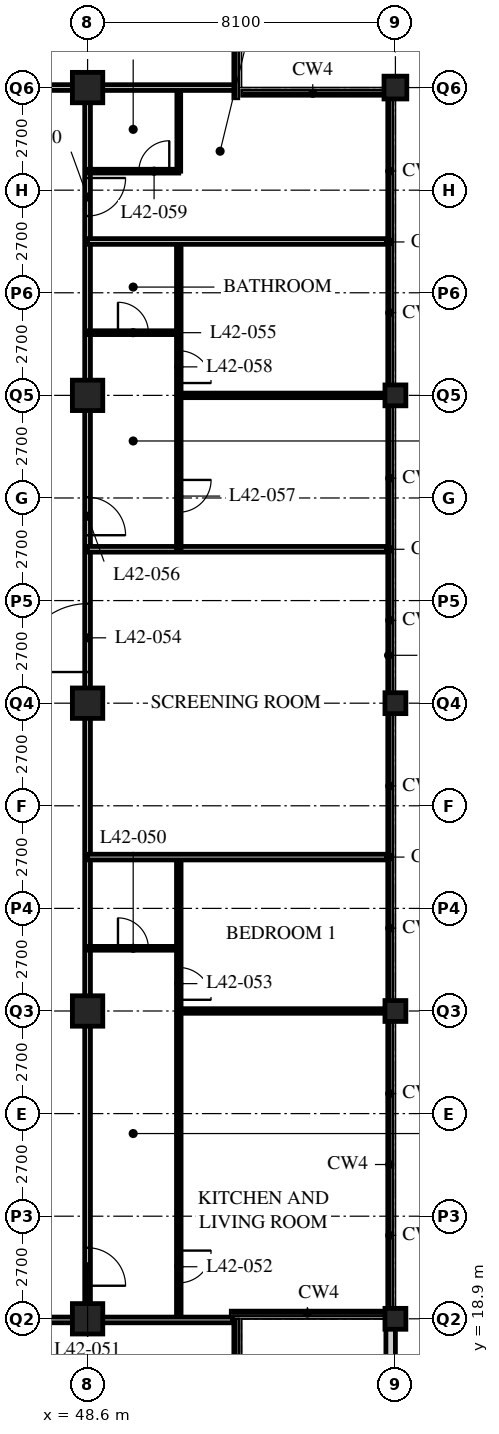
"""IFC4 building model, lengths in metres.
Left out: names, types, materials, properties, quantities, classifications, styles, units other than length and angle.
Written with IfcOpenShell. Run it as: python <this file> out.ifc"""

import sys

from ifc_helpers import new_model, si_unit, direction, frame, frame_2d, origin, origin_2d, place, context, subcontext, project, spatial, rectangle, hollow_rectangle, extrude, element, fill, save


model = new_model("IFC4")
c1 = context("Model", 3, precision=1e-05, world=origin(), true_north=direction((0.0, 1.0)))
c2 = subcontext(c1, "Body", "Model", "MODEL_VIEW")
j1 = project(units=[si_unit("LENGTHUNIT", "METRE"), si_unit("PLANEANGLEUNIT", "RADIAN")], contexts=[c1])
p1 = place(None, origin())
s1 = spatial("IfcSite", under=j1, at=p1, CompositionType="ELEMENT")
p2 = place(p1, origin())
s2 = spatial("IfcBuilding", under=s1, at=p2, CompositionType="ELEMENT")
p3 = place(p2, frame((0.0, 0.0, 165.0)))
s3 = spatial("IfcBuildingStorey", under=s2, at=p3, CompositionType="ELEMENT", Elevation=165.0)
for number, where, z_axis, x_axis in (
    (1, (48.6, 18.9, 0.0), (0.0, 0.0, 1.0), (1.0, 0.0, 0.0)),
    (2, (48.6, 27.0, 0.0), (0.0, 0.0, 1.0), (1.0, 0.0, 0.0)),
    (3, (48.6, 35.1, 0.0), (0.0, 0.0, 1.0), (1.0, 0.0, 0.0)),
    (4, (48.6, 43.2, 0.0), (0.0, 0.0, 1.0), (1.0, 0.0, 0.0)),
    (5, (48.6, 51.3, 0.0), (0.0, 0.0, 1.0), (1.0, 0.0, 0.0)),
):
    element("IfcColumn", number, at=place(p3, frame(where, z_axis=z_axis, x_axis=x_axis)), inside=s3, PredefinedType="COLUMN", context=c2, shape_type="SweptSolid", body=[
        extrude(hollow_rectangle(XDim=0.8, YDim=0.8, WallThickness=0.08, at=origin_2d()), origin(), (0.0, 0.0, 1.0), 5.4),
    ])
for number, where, z_axis, x_axis in (
    (6, (56.7, 18.9, 0.0), (0.0, 0.0, 1.0), (1.0, 0.0, 0.0)),
    (7, (56.7, 27.0, 0.0), (0.0, 0.0, 1.0), (1.0, 0.0, 0.0)),
    (8, (56.7, 35.1, 0.0), (0.0, 0.0, 1.0), (1.0, 0.0, 0.0)),
    (9, (56.7, 43.2, 0.0), (0.0, 0.0, 1.0), (1.0, 0.0, 0.0)),
):
    element("IfcColumn", number, at=place(p3, frame(where, z_axis=z_axis, x_axis=x_axis)), inside=s3, PredefinedType="COLUMN", context=c2, shape_type="SweptSolid", body=[
        extrude(hollow_rectangle(XDim=0.55, YDim=0.55, WallThickness=0.04, at=origin_2d()), origin(), (0.0, 0.0, 1.0), 5.4),
    ])
p4 = place(p3, frame((56.7, 51.3, 0.0), z_axis=(0.0, 0.0, 1.0), x_axis=(1.0, 0.0, 0.0)))
e10 = element("IfcColumn", 10, at=p4, inside=s3, PredefinedType="COLUMN", context=c2, shape_type="SweptSolid", body=[
    extrude(hollow_rectangle(XDim=0.6, YDim=0.6, WallThickness=0.05, at=origin_2d()), origin(), (0.0, 0.0, 1.0), 5.4),
])
p5 = place(p3, frame((56.575, 13.75, 0.0), z_axis=(0.0, 0.0, 1.0), x_axis=(0.0, 1.0, 0.0)))
e11 = element("IfcWall", 11, at=p5, inside=s3, PredefinedType="PARAPET", context=c2, shape_type="SweptSolid", body=[
    extrude(rectangle(XDim=5.15, YDim=0.25, at=frame_2d((2.575, 0.0))), origin(), (0.0, 0.0, 1.0), 1.38),
])
p6 = place(p3, frame((8.1, 18.9, 0.0), z_axis=(0.0, 0.0, 1.0), x_axis=(0.999999729567, -0.000735435758, 0.0)))
e12 = element("IfcWall", 12, at=p6, inside=s3, PredefinedType="PARTITIONING", context=c2, shape_type="SweptSolid", body=[
    extrude(rectangle(XDim=40.5, YDim=0.15, at=frame_2d((20.25, 0.0))), origin(), (0.0, 0.0, 1.0), 4.42),
])
p7 = place(p6, frame((4.45, 0.0, 0.0)))
e13 = element("IfcOpeningElement", 13, at=p7, cuts=e12, PredefinedType="OPENING", context=c2, shape_type="SweptSolid", body=[
    extrude(rectangle(XDim=1.0, YDim=2.1, at=frame_2d((0.5, 1.05))), frame((0.0, 0.085, 0.0), z_axis=(0.0, -1.0, 0.0), x_axis=(1.0, 0.0, 0.0)), (0.0, 0.0, 1.0), 0.17),
])
p8 = place(p6, frame((25.15, 0.0, 0.0)))
e14 = element("IfcOpeningElement", 14, at=p8, cuts=e12, PredefinedType="OPENING", context=c2, shape_type="SweptSolid", body=[
    extrude(rectangle(XDim=1.8, YDim=2.4, at=frame_2d((0.9, 1.2))), frame((0.0, 0.085, 0.0), z_axis=(0.0, -1.0, 0.0), x_axis=(1.0, 0.0, 0.0)), (0.0, 0.0, 1.0), 0.17),
])
p9 = place(p6, frame((29.875, 0.0, 0.0)))
e15 = element("IfcOpeningElement", 15, at=p9, cuts=e12, PredefinedType="OPENING", context=c2, shape_type="SweptSolid", body=[
    extrude(rectangle(XDim=1.0, YDim=2.1, at=frame_2d((0.5, 1.05))), frame((0.0, 0.085, 0.0), z_axis=(0.0, -1.0, 0.0), x_axis=(1.0, 0.0, 0.0)), (0.0, 0.0, 1.0), 0.17),
])
p10 = place(p6, frame((34.75, 0.0, 0.0)))
e16 = element("IfcOpeningElement", 16, at=p10, cuts=e12, PredefinedType="OPENING", context=c2, shape_type="SweptSolid", body=[
    extrude(rectangle(XDim=1.0, YDim=2.1, at=frame_2d((0.5, 1.05))), frame((0.0, 0.085, 0.0), z_axis=(0.0, -1.0, 0.0), x_axis=(1.0, 0.0, 0.0)), (0.0, 0.0, 1.0), 0.17),
])
p11 = place(p6, frame((1.525, 0.0, 0.0)))
e17 = element("IfcOpeningElement", 17, at=p11, cuts=e12, PredefinedType="OPENING", context=c2, shape_type="SweptSolid", body=[
    extrude(rectangle(XDim=1.0, YDim=2.1, at=frame_2d((0.5, 1.05))), frame((0.0, 0.085, 0.0), z_axis=(0.0, -1.0, 0.0), x_axis=(1.0, 0.0, 0.0)), (0.0, 0.0, 1.0), 0.17),
])
p12 = place(p6, frame((37.975, 0.0, 0.0)))
e18 = element("IfcOpeningElement", 18, at=p12, cuts=e12, PredefinedType="OPENING", context=c2, shape_type="SweptSolid", body=[
    extrude(rectangle(XDim=1.0, YDim=2.1, at=frame_2d((0.5, 1.05))), frame((0.0, 0.085, 0.0), z_axis=(0.0, -1.0, 0.0), x_axis=(1.0, 0.0, 0.0)), (0.0, 0.0, 1.0), 0.17),
])
p13 = place(p3, frame((8.1, 51.33, 0.0), z_axis=(0.0, 0.0, 1.0), x_axis=(0.999999725116, -0.000741463917, 0.0)))
e19 = element("IfcWall", 19, at=p13, inside=s3, PredefinedType="PARTITIONING", context=c2, shape_type="SweptSolid", body=[
    extrude(rectangle(XDim=40.5, YDim=0.15, at=frame_2d((20.25, 0.0))), origin(), (0.0, 0.0, 1.0), 4.42),
])
p14 = place(p13, frame((8.95, 0.0, 0.0)))
e20 = element("IfcOpeningElement", 20, at=p14, cuts=e19, PredefinedType="OPENING", context=c2, shape_type="SweptSolid", body=[
    extrude(rectangle(XDim=1.8, YDim=2.4, at=frame_2d((0.9, 1.2))), frame((0.0, 0.085, 0.0), z_axis=(0.0, -1.0, 0.0), x_axis=(1.0, 0.0, 0.0)), (0.0, 0.0, 1.0), 0.17),
])
p15 = place(p13, frame((17.05, 0.0, 0.0)))
e21 = element("IfcOpeningElement", 21, at=p15, cuts=e19, PredefinedType="OPENING", context=c2, shape_type="SweptSolid", body=[
    extrude(rectangle(XDim=1.8, YDim=2.4, at=frame_2d((0.9, 1.2))), frame((0.0, 0.085, 0.0), z_axis=(0.0, -1.0, 0.0), x_axis=(1.0, 0.0, 0.0)), (0.0, 0.0, 1.0), 0.17),
])
p16 = place(p13, frame((20.65, 0.0, 0.0)))
e22 = element("IfcOpeningElement", 22, at=p16, cuts=e19, PredefinedType="OPENING", context=c2, shape_type="SweptSolid", body=[
    extrude(rectangle(XDim=1.0, YDim=2.1, at=frame_2d((0.5, 1.05))), frame((0.0, 0.085, 0.0), z_axis=(0.0, -1.0, 0.0), x_axis=(1.0, 0.0, 0.0)), (0.0, 0.0, 1.0), 0.17),
])
p17 = place(p13, frame((28.75, 0.0, 0.0)))
e23 = element("IfcOpeningElement", 23, at=p17, cuts=e19, PredefinedType="OPENING", context=c2, shape_type="SweptSolid", body=[
    extrude(rectangle(XDim=1.0, YDim=2.1, at=frame_2d((0.5, 1.05))), frame((0.0, 0.085, 0.0), z_axis=(0.0, -1.0, 0.0), x_axis=(1.0, 0.0, 0.0)), (0.0, 0.0, 1.0), 0.17),
])
p18 = place(p13, frame((37.975, 0.0, 0.0)))
e24 = element("IfcOpeningElement", 24, at=p18, cuts=e19, PredefinedType="OPENING", context=c2, shape_type="SweptSolid", body=[
    extrude(rectangle(XDim=1.0, YDim=2.1, at=frame_2d((0.5, 1.05))), frame((0.0, 0.085, 0.0), z_axis=(0.0, -1.0, 0.0), x_axis=(1.0, 0.0, 0.0)), (0.0, 0.0, 1.0), 0.17),
])
p19 = place(p13, frame((1.525, 0.0, 0.0)))
e25 = element("IfcOpeningElement", 25, at=p19, cuts=e19, PredefinedType="OPENING", context=c2, shape_type="SweptSolid", body=[
    extrude(rectangle(XDim=1.0, YDim=2.1, at=frame_2d((0.5, 1.05))), frame((0.0, 0.085, 0.0), z_axis=(0.0, -1.0, 0.0), x_axis=(1.0, 0.0, 0.0)), (0.0, 0.0, 1.0), 0.17),
])
p20 = place(p3, frame((48.6, 18.87, 0.0), z_axis=(0.0, 0.0, 1.0), x_axis=(0.0, 1.0, 0.0)))
e26 = element("IfcWall", 26, at=p20, inside=s3, PredefinedType="PARTITIONING", context=c2, shape_type="SweptSolid", body=[
    extrude(rectangle(XDim=32.43, YDim=0.15, at=frame_2d((16.215, 0.0))), origin(), (0.0, 0.0, 1.0), 4.42),
])
p21 = place(p20, frame((0.9, 0.0, 0.0)))
e27 = element("IfcOpeningElement", 27, at=p21, cuts=e26, PredefinedType="OPENING", context=c2, shape_type="SweptSolid", body=[
    extrude(rectangle(XDim=1.0, YDim=2.1, at=frame_2d((0.5, 1.05))), frame((0.0, 0.085, 0.0), z_axis=(0.0, -1.0, 0.0), x_axis=(1.0, 0.0, 0.0)), (0.0, 0.0, 1.0), 0.17),
])
p22 = place(p20, frame((17.05, 0.0, 0.0)))
e28 = element("IfcOpeningElement", 28, at=p22, cuts=e26, PredefinedType="OPENING", context=c2, shape_type="SweptSolid", body=[
    extrude(rectangle(XDim=1.8, YDim=2.4, at=frame_2d((0.9, 1.2))), frame((0.0, 0.085, 0.0), z_axis=(0.0, -1.0, 0.0), x_axis=(1.0, 0.0, 0.0)), (0.0, 0.0, 1.0), 0.17),
])
p23 = place(p20, frame((20.65, 0.0, 0.0)))
e29 = element("IfcOpeningElement", 29, at=p23, cuts=e26, PredefinedType="OPENING", context=c2, shape_type="SweptSolid", body=[
    extrude(rectangle(XDim=1.0, YDim=2.1, at=frame_2d((0.5, 1.05))), frame((0.0, 0.085, 0.0), z_axis=(0.0, -1.0, 0.0), x_axis=(1.0, 0.0, 0.0)), (0.0, 0.0, 1.0), 0.17),
])
p24 = place(p20, frame((29.05, 0.0, 0.0)))
e30 = element("IfcOpeningElement", 30, at=p24, cuts=e26, PredefinedType="OPENING", context=c2, shape_type="SweptSolid", body=[
    extrude(rectangle(XDim=1.0, YDim=2.1, at=frame_2d((0.5, 1.05))), frame((0.0, 0.085, 0.0), z_axis=(0.0, -1.0, 0.0), x_axis=(1.0, 0.0, 0.0)), (0.0, 0.0, 1.0), 0.17),
])
p25 = place(p3, frame((51.0, 18.87, 0.0), z_axis=(0.0, 0.0, 1.0), x_axis=(0.0, 1.0, 0.0)))
e31 = element("IfcWall", 31, at=p25, inside=s3, PredefinedType="PARTITIONING", context=c2, shape_type="SweptSolid", body=[
    extrude(rectangle(XDim=12.18, YDim=0.12, at=frame_2d((6.09, 0.0))), origin(), (0.0, 0.0, 1.0), 5.19),
])
p26 = place(p25, frame((0.975, 0.0, 0.0)))
e32 = element("IfcOpeningElement", 32, at=p26, cuts=e31, PredefinedType="OPENING", context=c2, shape_type="SweptSolid", body=[
    extrude(rectangle(XDim=0.85, YDim=2.1, at=frame_2d((0.425, 1.05))), frame((0.0, 0.07, 0.0), z_axis=(0.0, -1.0, 0.0), x_axis=(1.0, 0.0, 0.0)), (0.0, 0.0, 1.0), 0.14),
])
p27 = place(p25, frame((8.425, 0.0, 0.0)))
e33 = element("IfcOpeningElement", 33, at=p27, cuts=e31, PredefinedType="OPENING", context=c2, shape_type="SweptSolid", body=[
    extrude(rectangle(XDim=0.85, YDim=2.1, at=frame_2d((0.425, 1.05))), frame((0.0, 0.07, 0.0), z_axis=(0.0, -1.0, 0.0), x_axis=(1.0, 0.0, 0.0)), (0.0, 0.0, 1.0), 0.14),
])
p28 = place(p3, frame((48.6, 28.65, 0.0), z_axis=(0.0, 0.0, 1.0), x_axis=(1.0, 0.0, 0.0)))
e34 = element("IfcWall", 34, at=p28, inside=s3, PredefinedType="PARTITIONING", context=c2, shape_type="SweptSolid", body=[
    extrude(rectangle(XDim=2.4, YDim=0.1, at=frame_2d((1.2, 0.0))), origin(), (0.0, 0.0, 1.0), 5.19),
])
p29 = place(p28, frame((0.8, 0.0, 0.0)))
e35 = element("IfcOpeningElement", 35, at=p29, cuts=e34, PredefinedType="OPENING", context=c2, shape_type="SweptSolid", body=[
    extrude(rectangle(XDim=0.8, YDim=2.1, at=frame_2d((0.4, 1.05))), frame((0.0, 0.06, 0.0), z_axis=(0.0, -1.0, 0.0), x_axis=(1.0, 0.0, 0.0)), (0.0, 0.0, 1.0), 0.12),
])
p30 = place(p3, frame((51.0, 27.0, 0.0), z_axis=(0.0, 0.0, 1.0), x_axis=(1.0, 0.0, 0.0)))
e36 = element("IfcWall", 36, at=p30, inside=s3, PredefinedType="PARTITIONING", context=c2, shape_type="SweptSolid", body=[
    extrude(rectangle(XDim=5.4, YDim=0.12, at=frame_2d((2.7, 0.0))), origin(), (0.0, 0.0, 1.0), 4.42),
])
for number, where, z_axis, x_axis in (
    (37, (48.6, 31.05, 0.0), (0.0, 0.0, 1.0), (1.0, 0.0, 0.0)),
    (38, (48.6, 39.15, 0.0), (0.0, 0.0, 1.0), (1.0, 0.0, 0.0)),
):
    element("IfcWall", number, at=place(p3, frame(where, z_axis=z_axis, x_axis=x_axis)), inside=s3, PredefinedType="PARTITIONING", context=c2, shape_type="SweptSolid", body=[
        extrude(rectangle(XDim=7.865, YDim=0.15, at=frame_2d((3.932, 0.0))), origin(), (0.0, 0.0, 1.0), 5.19),
    ])
p31 = place(p3, frame((51.0, 39.15, 0.0), z_axis=(0.0, 0.0, 1.0), x_axis=(0.0, 1.0, 0.0)))
e39 = element("IfcWall", 39, at=p31, inside=s3, PredefinedType="PARTITIONING", context=c2, shape_type="SweptSolid", body=[
    extrude(rectangle(XDim=8.1, YDim=0.12, at=frame_2d((4.05, 0.0))), origin(), (0.0, 0.0, 1.0), 5.19),
])
p32 = place(p31, frame((0.975, 0.0, 0.0)))
e40 = element("IfcOpeningElement", 40, at=p32, cuts=e39, PredefinedType="OPENING", context=c2, shape_type="SweptSolid", body=[
    extrude(rectangle(XDim=0.85, YDim=2.1, at=frame_2d((0.425, 1.05))), frame((0.0, 0.07, 0.0), z_axis=(0.0, -1.0, 0.0), x_axis=(1.0, 0.0, 0.0)), (0.0, 0.0, 1.0), 0.14),
])
p33 = place(p31, frame((4.375, 0.0, 0.0)))
e41 = element("IfcOpeningElement", 41, at=p33, cuts=e39, PredefinedType="OPENING", context=c2, shape_type="SweptSolid", body=[
    extrude(rectangle(XDim=0.85, YDim=2.1, at=frame_2d((0.425, 1.05))), frame((0.0, 0.07, 0.0), z_axis=(0.0, -1.0, 0.0), x_axis=(1.0, 0.0, 0.0)), (0.0, 0.0, 1.0), 0.14),
])
p34 = place(p3, frame((48.6, 44.85, 0.0), z_axis=(0.0, 0.0, 1.0), x_axis=(1.0, 0.0, 0.0)))
e42 = element("IfcWall", 42, at=p34, inside=s3, PredefinedType="PARTITIONING", context=c2, shape_type="SweptSolid", body=[
    extrude(rectangle(XDim=2.4, YDim=0.1, at=frame_2d((1.2, 0.0))), origin(), (0.0, 0.0, 1.0), 5.19),
])
p35 = place(p34, frame((0.8, 0.0, 0.0)))
e43 = element("IfcOpeningElement", 43, at=p35, cuts=e42, PredefinedType="OPENING", context=c2, shape_type="SweptSolid", body=[
    extrude(rectangle(XDim=0.8, YDim=2.1, at=frame_2d((0.4, 1.05))), frame((0.0, 0.06, 0.0), z_axis=(0.0, -1.0, 0.0), x_axis=(1.0, 0.0, 0.0)), (0.0, 0.0, 1.0), 0.12),
])
p36 = place(p3, frame((51.0, 43.2, 0.0), z_axis=(0.0, 0.0, 1.0), x_axis=(1.0, 0.0, 0.0)))
e44 = element("IfcWall", 44, at=p36, inside=s3, PredefinedType="PARTITIONING", context=c2, shape_type="SweptSolid", body=[
    extrude(rectangle(XDim=5.4, YDim=0.12, at=frame_2d((2.7, 0.0))), origin(), (0.0, 0.0, 1.0), 4.42),
])
p37 = place(p3, frame((48.6, 47.25, 0.0), z_axis=(0.0, 0.0, 1.0), x_axis=(1.0, 0.0, 0.0)))
e45 = element("IfcWall", 45, at=p37, inside=s3, PredefinedType="PARTITIONING", context=c2, shape_type="SweptSolid", body=[
    extrude(rectangle(XDim=7.865, YDim=0.15, at=frame_2d((3.932, 0.0))), origin(), (0.0, 0.0, 1.0), 5.19),
])
p38 = place(p3, frame((51.0, 49.1, 0.0), z_axis=(0.0, 0.0, 1.0), x_axis=(0.0, 1.0, 0.0)))
e46 = element("IfcWall", 46, at=p38, inside=s3, PredefinedType="PARTITIONING", context=c2, shape_type="SweptSolid", body=[
    extrude(rectangle(XDim=2.2, YDim=0.1, at=frame_2d((1.1, 0.0))), origin(), (0.0, 0.0, 1.0), 5.19),
])
p39 = place(p3, frame((48.6, 49.1, 0.0), z_axis=(0.0, 0.0, 1.0), x_axis=(1.0, 0.0, 0.0)))
e47 = element("IfcWall", 47, at=p39, inside=s3, PredefinedType="PARTITIONING", context=c2, shape_type="SweptSolid", body=[
    extrude(rectangle(XDim=2.4, YDim=0.1, at=frame_2d((1.2, 0.0))), origin(), (0.0, 0.0, 1.0), 5.19),
])
p40 = place(p39, frame((1.35, 0.0, 0.0)))
e48 = element("IfcOpeningElement", 48, at=p40, cuts=e47, PredefinedType="OPENING", context=c2, shape_type="SweptSolid", body=[
    extrude(rectangle(XDim=0.8, YDim=2.1, at=frame_2d((0.4, 1.05))), frame((0.0, 0.06, 0.0), z_axis=(0.0, -1.0, 0.0), x_axis=(1.0, 0.0, 0.0)), (0.0, 0.0, 1.0), 0.12),
])
p41 = place(p3, frame((48.6, 18.87, 0.0), z_axis=(0.0, 0.0, 1.0), x_axis=(1.0, 0.0, 0.0)))
e49 = element("IfcWall", 49, at=p41, inside=s3, PredefinedType="PARTITIONING", context=c2, shape_type="SweptSolid", body=[
    extrude(rectangle(XDim=3.814, YDim=0.15, at=frame_2d((1.907, 0.0))), origin(), (0.0, 0.0, 1.0), 4.42),
])
p42 = place(p3, frame((48.6, 51.3, 0.0), z_axis=(0.0, 0.0, 1.0), x_axis=(1.0, 0.0, 0.0)))
e50 = element("IfcWall", 50, at=p42, inside=s3, PredefinedType="PARTITIONING", context=c2, shape_type="SweptSolid", body=[
    extrude(rectangle(XDim=3.883, YDim=0.15, at=frame_2d((1.941, 0.0))), origin(), (0.0, 0.0, 1.0), 4.42),
])
p43 = place(p29, origin())
e51 = element("IfcDoor", 51, at=p43, inside=s3, OperationType="SINGLE_SWING_LEFT", PredefinedType="DOOR", context=c2, shape_type="SweptSolid", body=[
    extrude(rectangle(XDim=0.8, YDim=2.1, at=frame_2d((0.4, 1.05))), frame((0.0, 0.025, 0.0), z_axis=(0.0, -1.0, 0.0), x_axis=(1.0, 0.0, 0.0)), (0.0, 0.0, 1.0), 0.05),
])
fill(e35, e51)
p44 = place(p21, origin())
e52 = element("IfcDoor", 52, at=p44, inside=s3, OperationType="SINGLE_SWING_RIGHT", PredefinedType="DOOR", context=c2, shape_type="SweptSolid", body=[
    extrude(rectangle(XDim=1.0, YDim=2.1, at=frame_2d((0.5, 1.05))), frame((0.0, 0.025, 0.0), z_axis=(0.0, -1.0, 0.0), x_axis=(1.0, 0.0, 0.0)), (0.0, 0.0, 1.0), 0.05),
])
fill(e27, e52)
p45 = place(p26, origin())
e53 = element("IfcDoor", 53, at=p45, inside=s3, OperationType="SINGLE_SWING_LEFT", PredefinedType="DOOR", context=c2, shape_type="SweptSolid", body=[
    extrude(rectangle(XDim=0.85, YDim=2.1, at=frame_2d((0.425, 1.05))), frame((0.0, 0.025, 0.0), z_axis=(0.0, -1.0, 0.0), x_axis=(1.0, 0.0, 0.0)), (0.0, 0.0, 1.0), 0.05),
])
fill(e32, e53)
p46 = place(p27, origin())
e54 = element("IfcDoor", 54, at=p46, inside=s3, OperationType="SINGLE_SWING_RIGHT", PredefinedType="DOOR", context=c2, shape_type="SweptSolid", body=[
    extrude(rectangle(XDim=0.85, YDim=2.1, at=frame_2d((0.425, 1.05))), frame((0.0, 0.025, 0.0), z_axis=(0.0, -1.0, 0.0), x_axis=(1.0, 0.0, 0.0)), (0.0, 0.0, 1.0), 0.05),
])
fill(e33, e54)
p47 = place(p22, origin())
e55 = element("IfcDoor", 55, at=p47, inside=s3, OperationType="DOUBLE_DOOR_SINGLE_SWING", PredefinedType="DOOR", context=c2, shape_type="SweptSolid", body=[
    extrude(rectangle(XDim=1.8, YDim=2.4, at=frame_2d((0.9, 1.2))), frame((0.0, 0.025, 0.0), z_axis=(0.0, -1.0, 0.0), x_axis=(1.0, 0.0, 0.0)), (0.0, 0.0, 1.0), 0.05),
])
fill(e28, e55)
p48 = place(p35, origin())
e56 = element("IfcDoor", 56, at=p48, inside=s3, OperationType="SINGLE_SWING_LEFT", PredefinedType="DOOR", context=c2, shape_type="SweptSolid", body=[
    extrude(rectangle(XDim=0.8, YDim=2.1, at=frame_2d((0.4, 1.05))), frame((0.0, 0.025, 0.0), z_axis=(0.0, -1.0, 0.0), x_axis=(1.0, 0.0, 0.0)), (0.0, 0.0, 1.0), 0.05),
])
fill(e43, e56)
p49 = place(p23, origin())
e57 = element("IfcDoor", 57, at=p49, inside=s3, OperationType="SINGLE_SWING_RIGHT", PredefinedType="DOOR", context=c2, shape_type="SweptSolid", body=[
    extrude(rectangle(XDim=1.0, YDim=2.1, at=frame_2d((0.5, 1.05))), frame((0.0, 0.025, 0.0), z_axis=(0.0, -1.0, 0.0), x_axis=(1.0, 0.0, 0.0)), (0.0, 0.0, 1.0), 0.05),
])
fill(e29, e57)
p50 = place(p32, origin())
e58 = element("IfcDoor", 58, at=p50, inside=s3, OperationType="SINGLE_SWING_LEFT", PredefinedType="DOOR", context=c2, shape_type="SweptSolid", body=[
    extrude(rectangle(XDim=0.85, YDim=2.1, at=frame_2d((0.425, 1.05))), frame((0.0, 0.025, 0.0), z_axis=(0.0, -1.0, 0.0), x_axis=(1.0, 0.0, 0.0)), (0.0, 0.0, 1.0), 0.05),
])
fill(e40, e58)
p51 = place(p33, origin())
e59 = element("IfcDoor", 59, at=p51, inside=s3, OperationType="SINGLE_SWING_RIGHT", PredefinedType="DOOR", context=c2, shape_type="SweptSolid", body=[
    extrude(rectangle(XDim=0.85, YDim=2.1, at=frame_2d((0.425, 1.05))), frame((0.0, 0.025, 0.0), z_axis=(0.0, -1.0, 0.0), x_axis=(1.0, 0.0, 0.0)), (0.0, 0.0, 1.0), 0.05),
])
fill(e41, e59)
p52 = place(p40, origin())
e60 = element("IfcDoor", 60, at=p52, inside=s3, OperationType="SINGLE_SWING_RIGHT", PredefinedType="DOOR", context=c2, shape_type="SweptSolid", body=[
    extrude(rectangle(XDim=0.8, YDim=2.1, at=frame_2d((0.4, 1.05))), frame((0.0, 0.025, 0.0), z_axis=(0.0, -1.0, 0.0), x_axis=(1.0, 0.0, 0.0)), (0.0, 0.0, 1.0), 0.05),
])
fill(e48, e60)
p53 = place(p24, origin())
e61 = element("IfcDoor", 61, at=p53, inside=s3, OperationType="SINGLE_SWING_LEFT", PredefinedType="DOOR", context=c2, shape_type="SweptSolid", body=[
    extrude(rectangle(XDim=1.0, YDim=2.1, at=frame_2d((0.5, 1.05))), frame((0.0, 0.025, 0.0), z_axis=(0.0, -1.0, 0.0), x_axis=(1.0, 0.0, 0.0)), (0.0, 0.0, 1.0), 0.05),
])
fill(e30, e61)
save(model, sys.argv[1])
